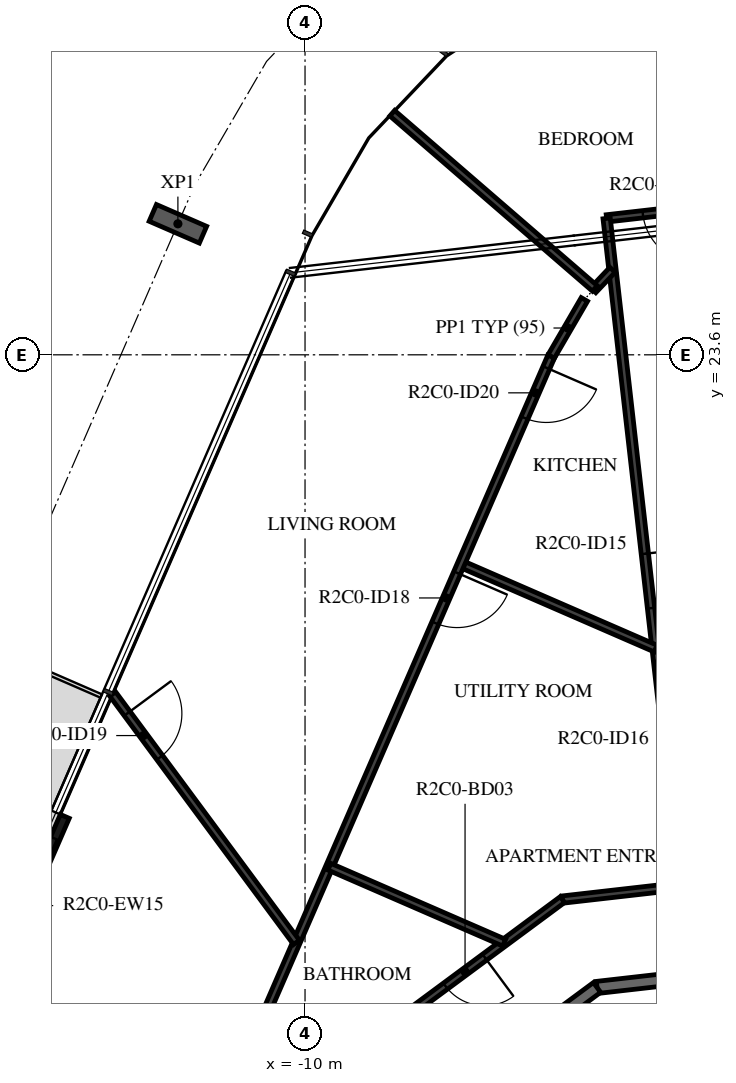
"""IFC4 building model, lengths in metres.
Left out: names, types, materials, properties, quantities, classifications, styles, units other than length and angle.
Written with IfcOpenShell. Run it as: python <this file> out.ifc"""

import sys

from ifc_helpers import new_model, si_unit, direction, frame, frame_2d, origin, origin_2d, place, context, subcontext, project, spatial, rectangle, i_section, extrude, element, fill, save


model = new_model("IFC4")
c1 = context("Model", 3, precision=1e-05, world=origin(), true_north=direction((0.0, 1.0)))
c2 = subcontext(c1, "Body", "Model", "MODEL_VIEW")
j1 = project(units=[si_unit("LENGTHUNIT", "METRE"), si_unit("PLANEANGLEUNIT", "RADIAN")], contexts=[c1])
p1 = place(None, origin())
s1 = spatial("IfcSite", under=j1, at=p1, CompositionType="ELEMENT")
p2 = place(p1, origin())
s2 = spatial("IfcBuilding", under=s1, at=p2, CompositionType="ELEMENT")
p3 = place(p2, frame((0.0, 0.0, 97.7)))
s3 = spatial("IfcBuildingStorey", under=s2, at=p3, CompositionType="ELEMENT", Elevation=97.7)
p4 = place(p3, frame((-12.091, 25.754, -0.38), z_axis=(0.0, 0.0, 1.0), x_axis=(0.398749038162, 0.917060087761, 0.0)))
e1 = element("IfcColumn", 1, at=p4, inside=s3, PredefinedType="COLUMN", context=c2, shape_type="SweptSolid", body=[
    extrude(i_section(OverallWidth=0.3, OverallDepth=0.9, WebThickness=0.019, FlangeThickness=0.035, FilletRadius=0.03, at=origin_2d()), origin(), (0.0, 0.0, 1.0), 3.5),
])
p5 = place(p3, frame((-13.951, 16.01, 0.0), z_axis=(0.0, 0.0, 1.0), x_axis=(-0.398720531764, -0.917072482168, 0.0)))
e2 = element("IfcWall", 2, at=p5, inside=s3, PredefinedType="STANDARD", context=c2, shape_type="SweptSolid", body=[
    extrude(rectangle(XDim=3.2, YDim=0.16, at=frame_2d((1.6, 0.0))), origin(), (0.0, 0.0, 1.0), 3.12),
])
p6 = place(p5, frame((0.4, 0.0, 0.0)))
e3 = element("IfcOpeningElement", 3, at=p6, cuts=e2, PredefinedType="OPENING", context=c2, shape_type="SweptSolid", body=[
    extrude(rectangle(XDim=2.4, YDim=2.4, at=frame_2d((1.2, 1.2))), frame((0.0, 0.09, 0.0), z_axis=(0.0, -1.0, 0.0), x_axis=(1.0, 0.0, 0.0)), (0.0, 0.0, 1.0), 0.18),
])
p7 = place(p3, frame((2.096, 14.028, 0.0), z_axis=(0.0, 0.0, 1.0), x_axis=(-0.993569170114, -0.113226782163, 0.0)))
e4 = element("IfcWall", 4, at=p7, inside=s3, PredefinedType="STANDARD", context=c2, shape_type="SweptSolid", body=[
    extrude(rectangle(XDim=7.342, YDim=0.2, at=frame_2d((3.671, 0.0))), origin(), (0.0, 0.0, 1.0), 3.12),
])
p8 = place(p3, frame((-5.198, 13.196, 0.0), z_axis=(0.0, 0.0, 1.0), x_axis=(-0.803869883159, -0.594805187394, 0.0)))
e5 = element("IfcWall", 5, at=p8, inside=s3, PredefinedType="STANDARD", context=c2, shape_type="SweptSolid", body=[
    extrude(rectangle(XDim=7.342, YDim=0.2, at=frame_2d((3.671, 0.0))), origin(), (0.0, 0.0, 1.0), 3.12),
])
p9 = place(p8, frame((5.8, 0.0, 0.0)))
e6 = element("IfcOpeningElement", 6, at=p9, cuts=e5, PredefinedType="OPENING", context=c2, shape_type="SweptSolid", body=[
    extrude(rectangle(XDim=1.0, YDim=2.1, at=frame_2d((0.5, 1.05))), frame((0.0, 0.11, 0.0), z_axis=(0.0, -1.0, 0.0), x_axis=(1.0, 0.0, 0.0)), (0.0, 0.0, 1.0), 0.22),
])
p10 = place(p3, frame((-3.351, 26.036, 0.0), z_axis=(0.0, 0.0, 1.0), x_axis=(-0.993575191649, -0.113173930474, 0.0)))
e7 = element("IfcWall", 7, at=p10, inside=s3, PredefinedType="PARTITIONING", context=c2, shape_type="SweptSolid", body=[
    extrude(rectangle(XDim=1.7, YDim=0.12, at=frame_2d((0.85, 0.0))), origin(), (0.0, 0.0, 1.0), 3.12),
])
p11 = place(p10, frame((0.2, 0.0, 0.0)))
e8 = element("IfcOpeningElement", 8, at=p11, cuts=e7, PredefinedType="OPENING", context=c2, shape_type="SweptSolid", body=[
    extrude(rectangle(XDim=0.9, YDim=2.1, at=frame_2d((0.45, 1.05))), frame((0.0, 0.07, 0.0), z_axis=(0.0, -1.0, 0.0), x_axis=(1.0, 0.0, 0.0)), (0.0, 0.0, 1.0), 0.14),
])
p12 = place(p3, frame((-5.04, 25.844, 0.0), z_axis=(0.0, 0.0, 1.0), x_axis=(0.1132106553, -0.993571007793, 0.0)))
e9 = element("IfcWall", 9, at=p12, inside=s3, PredefinedType="PARTITIONING", context=c2, shape_type="SweptSolid", body=[
    extrude(rectangle(XDim=11.048, YDim=0.12, at=frame_2d((5.524, 0.0))), origin(), (0.0, 0.0, 1.0), 3.12),
])
p13 = place(p12, frame((5.551, 0.0, 0.0)))
e10 = element("IfcOpeningElement", 10, at=p13, cuts=e9, PredefinedType="OPENING", context=c2, shape_type="SweptSolid", body=[
    extrude(rectangle(XDim=0.9, YDim=2.1, at=frame_2d((0.45, 1.05))), frame((0.0, 0.07, 0.0), z_axis=(0.0, -1.0, 0.0), x_axis=(1.0, 0.0, 0.0)), (0.0, 0.0, 1.0), 0.14),
])
p14 = place(p12, frame((7.32, 0.0, 0.0)))
e11 = element("IfcOpeningElement", 11, at=p14, cuts=e9, PredefinedType="OPENING", context=c2, shape_type="SweptSolid", body=[
    extrude(rectangle(XDim=0.9, YDim=2.1, at=frame_2d((0.45, 1.05))), frame((0.0, 0.07, 0.0), z_axis=(0.0, -1.0, 0.0), x_axis=(1.0, 0.0, 0.0)), (0.0, 0.0, 1.0), 0.14),
])
p15 = place(p3, frame((-3.79, 14.867, 0.0), z_axis=(0.0, 0.0, 1.0), x_axis=(-0.993557948123, -0.113325212204, 0.0)))
e12 = element("IfcWall", 12, at=p15, inside=s3, PredefinedType="PARTITIONING", context=c2, shape_type="SweptSolid", body=[
    extrude(rectangle(XDim=1.991, YDim=0.12, at=frame_2d((0.995, 0.0))), origin(), (0.0, 0.0, 1.0), 3.12),
])
p16 = place(p3, frame((-5.767, 14.641, 0.0), z_axis=(0.0, 0.0, 1.0), x_axis=(-0.803853364238, -0.594827511807, 0.0)))
e13 = element("IfcWall", 13, at=p16, inside=s3, PredefinedType="PARTITIONING", context=c2, shape_type="SweptSolid", body=[
    extrude(rectangle(XDim=8.146, YDim=0.12, at=frame_2d((4.073, 0.0))), origin(), (0.0, 0.0, 1.0), 3.12),
])
p17 = place(p16, frame((1.592, 0.0, 0.0)))
e14 = element("IfcOpeningElement", 14, at=p17, cuts=e13, PredefinedType="OPENING", context=c2, shape_type="SweptSolid", body=[
    extrude(rectangle(XDim=0.8, YDim=2.1, at=frame_2d((0.4, 1.05))), frame((0.0, 0.07, 0.0), z_axis=(0.0, -1.0, 0.0), x_axis=(1.0, 0.0, 0.0)), (0.0, 0.0, 1.0), 0.14),
])
p18 = place(p3, frame((-5.261, 24.663, 0.0), z_axis=(0.0, 0.0, 1.0), x_axis=(0.688346106747, 0.725382407648, 0.0)))
e15 = element("IfcWall", 15, at=p18, inside=s3, PredefinedType="PARTITIONING", context=c2, shape_type="SweptSolid", body=[
    extrude(rectangle(XDim=0.461, YDim=0.12, at=frame_2d((0.231, 0.0))), origin(), (0.0, 0.0, 1.0), 3.12),
])
p19 = place(p3, frame((-8.566, 27.573, 0.0), z_axis=(0.0, 0.0, 1.0), x_axis=(0.756463964606, -0.654035373854, 0.0)))
e16 = element("IfcWall", 16, at=p19, inside=s3, PredefinedType="PARTITIONING", context=c2, shape_type="SweptSolid", body=[
    extrude(rectangle(XDim=4.405, YDim=0.12, at=frame_2d((2.202, 0.0))), origin(), (0.0, 0.0, 1.0), 3.12),
])
p20 = place(p3, frame((-7.435, 20.161, 0.0), z_axis=(0.0, 0.0, 1.0), x_axis=(0.917055599503, -0.398759360291, 0.0)))
e17 = element("IfcWall", 17, at=p20, inside=s3, PredefinedType="PARTITIONING", context=c2, shape_type="SweptSolid", body=[
    extrude(rectangle(XDim=3.49, YDim=0.12, at=frame_2d((1.745, 0.0))), origin(), (0.0, 0.0, 1.0), 3.12),
])
p21 = place(p3, frame((-5.406, 24.51, 0.0), z_axis=(0.0, 0.0, 1.0), x_axis=(-0.502487709822, -0.864584351858, 0.0)))
e18 = element("IfcWall", 18, at=p21, inside=s3, PredefinedType="PARTITIONING", context=c2, shape_type="SweptSolid", body=[
    extrude(rectangle(XDim=1.087, YDim=0.12, at=frame_2d((0.543, 0.0))), origin(), (0.0, 0.0, 1.0), 3.12),
])
p22 = place(p3, frame((-5.952, 23.571, 0.0), z_axis=(0.0, 0.0, 1.0), x_axis=(-0.398745097158, -0.917061801348, 0.0)))
e19 = element("IfcWall", 19, at=p22, inside=s3, PredefinedType="PARTITIONING", context=c2, shape_type="SweptSolid", body=[
    extrude(rectangle(XDim=14.576, YDim=0.12, at=frame_2d((7.288, 0.0))), origin(), (0.0, 0.0, 1.0), 3.12),
])
p23 = place(p22, frame((3.878, 0.0, 0.0)))
e20 = element("IfcOpeningElement", 20, at=p23, cuts=e19, PredefinedType="OPENING", context=c2, shape_type="SweptSolid", body=[
    extrude(rectangle(XDim=0.9, YDim=2.1, at=frame_2d((0.45, 1.05))), frame((0.0, 0.07, 0.0), z_axis=(0.0, -1.0, 0.0), x_axis=(1.0, 0.0, 0.0)), (0.0, 0.0, 1.0), 0.14),
])
p24 = place(p22, frame((0.2, 0.0, 0.0)))
e21 = element("IfcOpeningElement", 21, at=p24, cuts=e19, PredefinedType="OPENING", context=c2, shape_type="SweptSolid", body=[
    extrude(rectangle(XDim=0.9, YDim=2.1, at=frame_2d((0.45, 1.05))), frame((0.0, 0.07, 0.0), z_axis=(0.0, -1.0, 0.0), x_axis=(1.0, 0.0, 0.0)), (0.0, 0.0, 1.0), 0.14),
])
p25 = place(p3, frame((-9.6, 15.182, 0.0), z_axis=(0.0, 0.0, 1.0), x_axis=(0.917073771145, -0.398717567054, 0.0)))
e22 = element("IfcWall", 22, at=p25, inside=s3, PredefinedType="PARTITIONING", context=c2, shape_type="SweptSolid", body=[
    extrude(rectangle(XDim=3.135, YDim=0.12, at=frame_2d((1.567, 0.0))), origin(), (0.0, 0.0, 1.0), 3.12),
])
p26 = place(p3, frame((-13.163, 18.022, 0.0), z_axis=(0.0, 0.0, 1.0), x_axis=(0.594797671626, -0.803875444226, 0.0)))
e23 = element("IfcWall", 23, at=p26, inside=s3, PredefinedType="PARTITIONING", context=c2, shape_type="SweptSolid", body=[
    extrude(rectangle(XDim=5.081, YDim=0.12, at=frame_2d((2.54, 0.0))), origin(), (0.0, 0.0, 1.0), 3.12),
])
p27 = place(p26, frame((0.4, 0.0, 0.0)))
e24 = element("IfcOpeningElement", 24, at=p27, cuts=e23, PredefinedType="OPENING", context=c2, shape_type="SweptSolid", body=[
    extrude(rectangle(XDim=0.9, YDim=2.1, at=frame_2d((0.45, 1.05))), frame((0.0, 0.07, 0.0), z_axis=(0.0, -1.0, 0.0), x_axis=(1.0, 0.0, 0.0)), (0.0, 0.0, 1.0), 0.14),
])
p28 = place(p6, origin())
e25 = element("IfcDoor", 25, at=p28, inside=s3, OperationType="DOUBLE_DOOR_SLIDING", PredefinedType="DOOR", context=c2, shape_type="SweptSolid", body=[
    extrude(rectangle(XDim=2.4, YDim=2.4, at=frame_2d((1.2, 1.2))), frame((0.0, 0.025, 0.0), z_axis=(0.0, -1.0, 0.0), x_axis=(1.0, 0.0, 0.0)), (0.0, 0.0, 1.0), 0.05),
])
fill(e3, e25)
p29 = place(p11, origin())
e26 = element("IfcDoor", 26, at=p29, inside=s3, OperationType="SINGLE_SWING_RIGHT", PredefinedType="DOOR", context=c2, shape_type="SweptSolid", body=[
    extrude(rectangle(XDim=0.9, YDim=2.1, at=frame_2d((0.45, 1.05))), frame((0.0, 0.025, 0.0), z_axis=(0.0, -1.0, 0.0), x_axis=(1.0, 0.0, 0.0)), (0.0, 0.0, 1.0), 0.05),
])
fill(e8, e26)
p30 = place(p13, origin())
e27 = element("IfcDoor", 27, at=p30, inside=s3, OperationType="SINGLE_SWING_LEFT", PredefinedType="DOOR", context=c2, shape_type="SweptSolid", body=[
    extrude(rectangle(XDim=0.9, YDim=2.1, at=frame_2d((0.45, 1.05))), frame((0.0, 0.025, 0.0), z_axis=(0.0, -1.0, 0.0), x_axis=(1.0, 0.0, 0.0)), (0.0, 0.0, 1.0), 0.05),
])
fill(e10, e27)
p31 = place(p14, origin())
e28 = element("IfcDoor", 28, at=p31, inside=s3, OperationType="SINGLE_SWING_LEFT", PredefinedType="DOOR", context=c2, shape_type="SweptSolid", body=[
    extrude(rectangle(XDim=0.9, YDim=2.1, at=frame_2d((0.45, 1.05))), frame((0.0, 0.025, 0.0), z_axis=(0.0, -1.0, 0.0), x_axis=(1.0, 0.0, 0.0)), (0.0, 0.0, 1.0), 0.05),
])
fill(e11, e28)
p32 = place(p17, origin())
e29 = element("IfcDoor", 29, at=p32, inside=s3, OperationType="SINGLE_SWING_LEFT", PredefinedType="DOOR", context=c2, shape_type="SweptSolid", body=[
    extrude(rectangle(XDim=0.8, YDim=2.1, at=frame_2d((0.4, 1.05))), frame((0.0, 0.025, 0.0), z_axis=(0.0, -1.0, 0.0), x_axis=(1.0, 0.0, 0.0)), (0.0, 0.0, 1.0), 0.05),
])
fill(e14, e29)
p33 = place(p23, origin())
e30 = element("IfcDoor", 30, at=p33, inside=s3, OperationType="SINGLE_SWING_LEFT", PredefinedType="DOOR", context=c2, shape_type="SweptSolid", body=[
    extrude(rectangle(XDim=0.9, YDim=2.1, at=frame_2d((0.45, 1.05))), frame((0.0, 0.025, 0.0), z_axis=(0.0, -1.0, 0.0), x_axis=(1.0, 0.0, 0.0)), (0.0, 0.0, 1.0), 0.05),
])
fill(e20, e30)
p34 = place(p27, origin())
e31 = element("IfcDoor", 31, at=p34, inside=s3, OperationType="SINGLE_SWING_RIGHT", PredefinedType="DOOR", context=c2, shape_type="SweptSolid", body=[
    extrude(rectangle(XDim=0.9, YDim=2.1, at=frame_2d((0.45, 1.05))), frame((0.0, 0.025, 0.0), z_axis=(0.0, -1.0, 0.0), x_axis=(1.0, 0.0, 0.0)), (0.0, 0.0, 1.0), 0.05),
])
fill(e24, e31)
p35 = place(p24, origin())
e32 = element("IfcDoor", 32, at=p35, inside=s3, OperationType="SINGLE_SWING_RIGHT", PredefinedType="DOOR", context=c2, shape_type="SweptSolid", body=[
    extrude(rectangle(XDim=0.9, YDim=2.1, at=frame_2d((0.45, 1.05))), frame((0.0, 0.025, 0.0), z_axis=(0.0, -1.0, 0.0), x_axis=(1.0, 0.0, 0.0)), (0.0, 0.0, 1.0), 0.05),
])
fill(e21, e32)
save(model, sys.argv[1])
